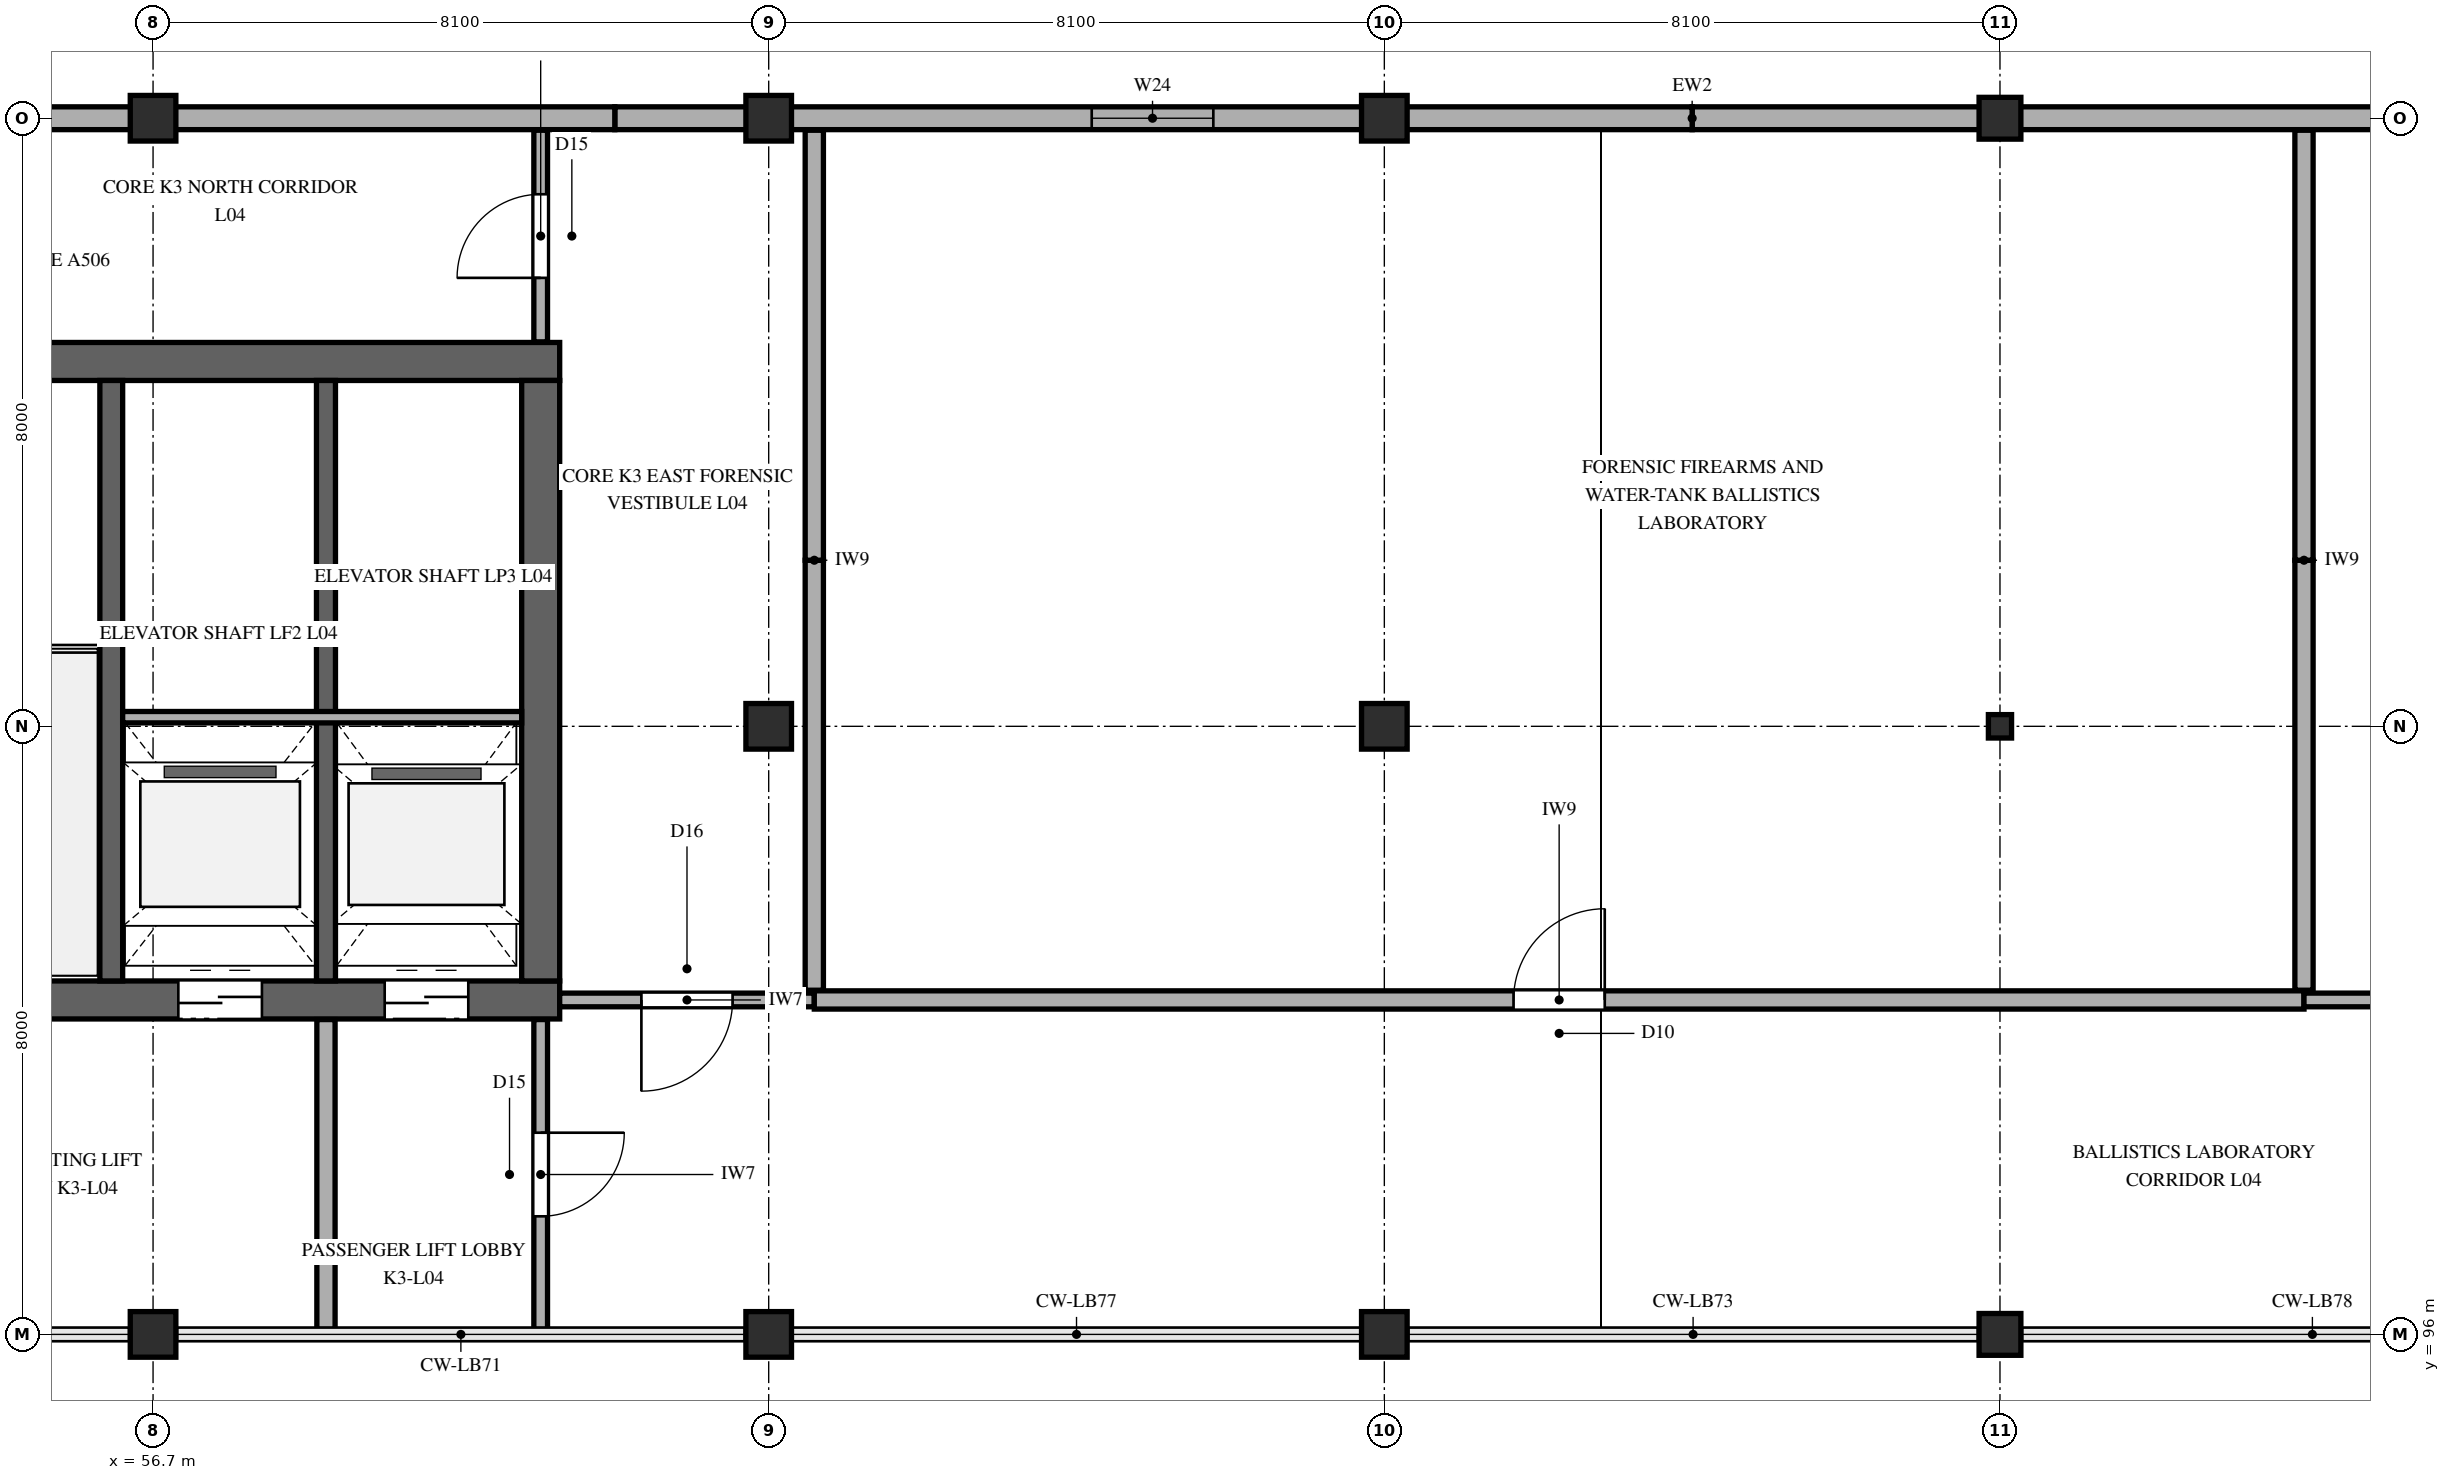
"""IFC4 building model, lengths in metres.
Left out: names, types, materials, properties, quantities, classifications, styles, units other than length and angle.
Written with IfcOpenShell. Run it as: python <this file> out.ifc"""

import sys

from ifc_helpers import new_model, si_unit, direction, frame, frame_2d, origin, origin_2d, place, context, subcontext, project, spatial, rectangle, i_section, extrude, element, fill, save


model = new_model("IFC4")
c1 = context("Model", 3, precision=1e-05, world=origin(), true_north=direction((0.0, 1.0)))
c2 = subcontext(c1, "Body", "Model", "MODEL_VIEW")
j1 = project(units=[si_unit("LENGTHUNIT", "METRE"), si_unit("PLANEANGLEUNIT", "RADIAN")], contexts=[c1])
p1 = place(None, origin())
s1 = spatial("IfcSite", under=j1, at=p1, CompositionType="ELEMENT")
p2 = place(p1, origin())
s2 = spatial("IfcBuilding", under=s1, at=p2, CompositionType="ELEMENT")
p3 = place(p2, frame((0.0, 0.0, 19.8)))
s3 = spatial("IfcBuildingStorey", under=s2, at=p3, CompositionType="ELEMENT", Elevation=19.8)
p4 = place(p3, frame((46.75, 100.4, 0.0), z_axis=(0.0, 0.0, 1.0), x_axis=(1.0, 0.0, 0.0)))
e1 = element("IfcWall", 1, at=p4, inside=s3, PredefinedType="SHEAR", context=c2, shape_type="SweptSolid", body=[
    extrude(rectangle(XDim=15.3, YDim=0.5, at=frame_2d((7.65, 0.0))), origin(), (0.0, 0.0, 1.0), 5.1),
])
p5 = place(p4, frame((1.0, 0.0, 0.0)))
e2 = element("IfcOpeningElement", 2, at=p5, cuts=e1, PredefinedType="OPENING", context=c2, shape_type="SweptSolid", body=[
    extrude(rectangle(XDim=1.15, YDim=2.25, at=frame_2d((0.575, 1.125))), frame((0.0, 0.26, 0.0), z_axis=(0.0, -1.0, 0.0), x_axis=(1.0, 0.0, 0.0)), (0.0, 0.0, 1.0), 0.52),
])
p6 = place(p4, frame((10.282, 0.0, 0.0)))
e3 = element("IfcOpeningElement", 3, at=p6, cuts=e1, PredefinedType="OPENING", context=c2, shape_type="SweptSolid", body=[
    extrude(rectangle(XDim=1.1, YDim=2.2, at=frame_2d((0.55, 1.1))), frame((0.0, 0.26, 0.0), z_axis=(0.0, -1.0, 0.0), x_axis=(1.0, 0.0, 0.0)), (0.0, 0.0, 1.0), 0.52),
])
p7 = place(p4, frame((12.998, 0.0, 0.0)))
e4 = element("IfcOpeningElement", 4, at=p7, cuts=e1, PredefinedType="OPENING", context=c2, shape_type="SweptSolid", body=[
    extrude(rectangle(XDim=1.1, YDim=2.2, at=frame_2d((0.55, 1.1))), frame((0.0, 0.26, 0.0), z_axis=(0.0, -1.0, 0.0), x_axis=(1.0, 0.0, 0.0)), (0.0, 0.0, 1.0), 0.52),
])
p8 = place(p3, frame((46.75, 108.8, 0.0), z_axis=(0.0, 0.0, 1.0), x_axis=(1.0, 0.0, 0.0)))
e5 = element("IfcWall", 5, at=p8, inside=s3, PredefinedType="SHEAR", context=c2, shape_type="SweptSolid", body=[
    extrude(rectangle(XDim=15.3, YDim=0.5, at=frame_2d((7.65, 0.0))), origin(), (0.0, 0.0, 1.0), 5.1),
])
p9 = place(p3, frame((61.8, 100.65, 0.0), z_axis=(0.0, 0.0, 1.0), x_axis=(0.0, 1.0, 0.0)))
e6 = element("IfcWall", 6, at=p9, inside=s3, PredefinedType="SHEAR", context=c2, shape_type="SweptSolid", body=[
    extrude(rectangle(XDim=7.9, YDim=0.5, at=frame_2d((3.95, 0.0))), origin(), (0.0, 0.0, 1.0), 5.1),
])
p10 = place(p3, frame((56.15, 100.65, 0.0), z_axis=(0.0, 0.0, 1.0), x_axis=(0.0, 1.0, 0.0)))
e7 = element("IfcWall", 7, at=p10, inside=s3, PredefinedType="SHEAR", context=c2, shape_type="SweptSolid", body=[
    extrude(rectangle(XDim=7.9, YDim=0.3, at=frame_2d((3.95, 0.0))), origin(), (0.0, 0.0, 1.0), 5.1),
])
p11 = place(p3, frame((58.975, 100.65, 0.0), z_axis=(0.0, 0.0, 1.0), x_axis=(0.0, 1.0, 0.0)))
e8 = element("IfcWall", 8, at=p11, inside=s3, PredefinedType="SHEAR", context=c2, shape_type="SweptSolid", body=[
    extrude(rectangle(XDim=7.9, YDim=0.25, at=frame_2d((3.95, 0.0))), origin(), (0.0, 0.0, 1.0), 5.1),
])
for number, where, z_axis, x_axis in (
    (9, (56.7, 96.0, 0.0), (0.0, 0.0, 1.0), (1.0, 0.0, 0.0)),
    (10, (56.7, 112.0, 0.0), (0.0, 0.0, 1.0), (1.0, 0.0, 0.0)),
    (11, (64.8, 96.0, 0.0), (0.0, 0.0, 1.0), (1.0, 0.0, 0.0)),
    (12, (64.8, 104.0, 0.0), (0.0, 0.0, 1.0), (1.0, 0.0, 0.0)),
    (13, (64.8, 112.0, 0.0), (0.0, 0.0, 1.0), (1.0, 0.0, 0.0)),
    (14, (72.9, 96.0, 0.0), (0.0, 0.0, 1.0), (1.0, 0.0, 0.0)),
    (15, (72.9, 104.0, 0.0), (0.0, 0.0, 1.0), (1.0, 0.0, 0.0)),
    (16, (72.9, 112.0, 0.0), (0.0, 0.0, 1.0), (1.0, 0.0, 0.0)),
):
    element("IfcColumn", number, at=place(p3, frame(where, z_axis=z_axis, x_axis=x_axis)), inside=s3, PredefinedType="COLUMN", context=c2, shape_type="SweptSolid", body=[
        extrude(rectangle(XDim=0.6, YDim=0.6, at=origin_2d()), origin(), (0.0, 0.0, 1.0), 5.1),
    ])
p12 = place(p3, frame((81.0, 96.0, 0.0), z_axis=(0.0, 0.0, 1.0), x_axis=(1.0, 0.0, 0.0)))
e17 = element("IfcColumn", 17, at=p12, inside=s3, PredefinedType="COLUMN", context=c2, shape_type="SweptSolid", body=[
    extrude(rectangle(XDim=0.55, YDim=0.55, at=origin_2d()), origin(), (0.0, 0.0, 1.0), 5.1),
])
p13 = place(p3, frame((81.0, 104.0, 0.0), z_axis=(0.0, 0.0, 1.0), x_axis=(1.0, 0.0, 0.0)))
e18 = element("IfcColumn", 18, at=p13, inside=s3, PredefinedType="COLUMN", context=c2, shape_type="SweptSolid", body=[
    extrude(i_section(OverallWidth=0.305, OverallDepth=0.308, WebThickness=0.01, FlangeThickness=0.015, FilletRadius=0.015, at=origin_2d()), origin(), (0.0, 0.0, 1.0), 5.1),
])
p14 = place(p3, frame((81.0, 112.0, 0.0), z_axis=(0.0, 0.0, 1.0), x_axis=(1.0, 0.0, 0.0)))
e19 = element("IfcColumn", 19, at=p14, inside=s3, PredefinedType="COLUMN", context=c2, shape_type="SweptSolid", body=[
    extrude(rectangle(XDim=0.55, YDim=0.55, at=origin_2d()), origin(), (0.0, 0.0, 1.0), 5.1),
])
p15 = place(p3, frame((91.125, 112.0, 0.0), z_axis=(0.0, 0.0, 1.0), x_axis=(-1.0, 0.0, 0.0)))
e20 = element("IfcWall", 20, at=p15, inside=s3, PredefinedType="SOLIDWALL", context=c2, shape_type="SweptSolid", body=[
    extrude(rectangle(XDim=14.175, YDim=0.3, at=frame_2d((7.087, 0.0))), origin(), (0.0, 0.0, 1.0), 4.202),
])
p16 = place(p3, frame((76.95, 112.0, 0.0), z_axis=(0.0, 0.0, 1.0), x_axis=(-1.0, 0.0, 0.0)))
e21 = element("IfcWall", 21, at=p16, inside=s3, PredefinedType="SOLIDWALL", context=c2, shape_type="SweptSolid", body=[
    extrude(rectangle(XDim=14.175, YDim=0.3, at=frame_2d((7.087, 0.0))), origin(), (0.0, 0.0, 1.0), 4.302),
])
p17 = place(p16, frame((6.3, 0.0, 0.95)))
e22 = element("IfcOpeningElement", 22, at=p17, cuts=e21, PredefinedType="OPENING", context=c2, shape_type="SweptSolid", body=[
    extrude(rectangle(XDim=1.6, YDim=1.4, at=frame_2d((0.8, 0.7))), frame((0.0, 0.16, 0.0), z_axis=(0.0, -1.0, 0.0), x_axis=(1.0, 0.0, 0.0)), (0.0, 0.0, 1.0), 0.32),
])
p18 = place(p3, frame((62.775, 112.0, 0.0), z_axis=(0.0, 0.0, 1.0), x_axis=(-1.0, 0.0, 0.0)))
e23 = element("IfcWall", 23, at=p18, inside=s3, PredefinedType="SOLIDWALL", context=c2, shape_type="SweptSolid", body=[
    extrude(rectangle(XDim=14.175, YDim=0.3, at=frame_2d((7.087, 0.0))), origin(), (0.0, 0.0, 1.0), 4.302),
])
p19 = place(p18, frame((9.0, 0.0, 0.95)))
e24 = element("IfcOpeningElement", 24, at=p19, cuts=e23, PredefinedType="OPENING", context=c2, shape_type="SweptSolid", body=[
    extrude(rectangle(XDim=0.9, YDim=1.8, at=frame_2d((0.45, 0.9))), frame((0.0, 0.16, 0.0), z_axis=(0.0, -1.0, 0.0), x_axis=(1.0, 0.0, 0.0)), (0.0, 0.0, 1.0), 0.32),
])
p20 = place(p3, frame((56.3, 104.12, 0.0), z_axis=(0.0, 0.0, 1.0), x_axis=(1.0, 0.0, 0.0)))
e25 = element("IfcWall", 25, at=p20, inside=s3, PredefinedType="PARTITIONING", context=c2, shape_type="SweptSolid", body=[
    extrude(rectangle(XDim=5.25, YDim=0.15, at=frame_2d((2.625, 0.0))), origin(), (0.0, 0.0, 1.0), 4.86),
])
p21 = place(p3, frame((62.05, 100.4, 0.0), z_axis=(0.0, 0.0, 1.0), x_axis=(1.0, 0.0, 0.0)))
e26 = element("IfcWall", 26, at=p21, inside=s3, PredefinedType="PARTITIONING", context=c2, shape_type="SweptSolid", body=[
    extrude(rectangle(XDim=3.35, YDim=0.18, at=frame_2d((1.675, 0.0))), origin(), (0.0, 0.0, 1.0), 4.86),
])
p22 = place(p21, frame((1.075, 0.0, 0.0)))
e27 = element("IfcOpeningElement", 27, at=p22, cuts=e26, PredefinedType="OPENING", context=c2, shape_type="SweptSolid", body=[
    extrude(rectangle(XDim=1.2, YDim=2.2, at=frame_2d((0.6, 1.1))), frame((0.0, 0.1, 0.0), z_axis=(0.0, -1.0, 0.0), x_axis=(1.0, 0.0, 0.0)), (0.0, 0.0, 1.0), 0.2),
])
p23 = place(p3, frame((65.4, 100.4, 0.0), z_axis=(0.0, 0.0, 1.0), x_axis=(1.0, 0.0, 0.0)))
e28 = element("IfcWall", 28, at=p23, inside=s3, PredefinedType="PARTITIONING", context=c2, shape_type="SweptSolid", body=[
    extrude(rectangle(XDim=19.6, YDim=0.24, at=frame_2d((9.8, 0.0))), origin(), (0.0, 0.0, 1.0), 4.86),
])
p24 = place(p23, frame((9.2, 0.0, 0.0)))
e29 = element("IfcOpeningElement", 29, at=p24, cuts=e28, PredefinedType="OPENING", context=c2, shape_type="SweptSolid", body=[
    extrude(rectangle(XDim=1.2, YDim=2.3, at=frame_2d((0.6, 1.15))), frame((0.0, 0.13, 0.0), z_axis=(0.0, -1.0, 0.0), x_axis=(1.0, 0.0, 0.0)), (0.0, 0.0, 1.0), 0.26),
])
p25 = place(p3, frame((85.0, 100.4, 0.0), z_axis=(0.0, 0.0, 1.0), x_axis=(1.0, 0.0, 0.0)))
e30 = element("IfcWall", 30, at=p25, inside=s3, PredefinedType="PARTITIONING", context=c2, shape_type="SweptSolid", body=[
    extrude(rectangle(XDim=20.132, YDim=0.18, at=frame_2d((10.066, 0.0))), origin(), (0.0, 0.0, 1.0), 4.86),
])
p26 = place(p25, frame((9.466, 0.0, 0.0)))
e31 = element("IfcOpeningElement", 31, at=p26, cuts=e30, PredefinedType="OPENING", context=c2, shape_type="SweptSolid", body=[
    extrude(rectangle(XDim=1.2, YDim=2.3, at=frame_2d((0.6, 1.15))), frame((0.0, 0.1, 0.0), z_axis=(0.0, -1.0, 0.0), x_axis=(1.0, 0.0, 0.0)), (0.0, 0.0, 1.0), 0.2),
])
p27 = place(p3, frame((58.975, 96.065, 0.0), z_axis=(0.0, 0.0, 1.0), x_axis=(0.0, 1.0, 0.0)))
e32 = element("IfcWall", 32, at=p27, inside=s3, PredefinedType="PARTITIONING", context=c2, shape_type="SweptSolid", body=[
    extrude(rectangle(XDim=4.077, YDim=0.24, at=frame_2d((2.039, 0.0))), origin(), (0.0, 0.0, 1.0), 4.86),
])
p28 = place(p3, frame((61.8, 96.065, 0.0), z_axis=(0.0, 0.0, 1.0), x_axis=(0.0, 1.0, 0.0)))
e33 = element("IfcWall", 33, at=p28, inside=s3, PredefinedType="PARTITIONING", context=c2, shape_type="SweptSolid", body=[
    extrude(rectangle(XDim=4.077, YDim=0.18, at=frame_2d((2.039, 0.0))), origin(), (0.0, 0.0, 1.0), 4.86),
])
p29 = place(p28, frame((1.489, 0.0, 0.0)))
e34 = element("IfcOpeningElement", 34, at=p29, cuts=e33, PredefinedType="OPENING", context=c2, shape_type="SweptSolid", body=[
    extrude(rectangle(XDim=1.1, YDim=2.2, at=frame_2d((0.55, 1.1))), frame((0.0, 0.1, 0.0), z_axis=(0.0, -1.0, 0.0), x_axis=(1.0, 0.0, 0.0)), (0.0, 0.0, 1.0), 0.2),
])
p30 = place(p3, frame((61.8, 109.058, 0.0), z_axis=(0.0, 0.0, 1.0), x_axis=(0.0, 1.0, 0.0)))
e35 = element("IfcWall", 35, at=p30, inside=s3, PredefinedType="PARTITIONING", context=c2, shape_type="SweptSolid", body=[
    extrude(rectangle(XDim=2.784, YDim=0.18, at=frame_2d((1.392, 0.0))), origin(), (0.0, 0.0, 1.0), 4.86),
])
p31 = place(p30, frame((0.842, 0.0, 0.0)))
e36 = element("IfcOpeningElement", 36, at=p31, cuts=e35, PredefinedType="OPENING", context=c2, shape_type="SweptSolid", body=[
    extrude(rectangle(XDim=1.1, YDim=2.2, at=frame_2d((0.55, 1.1))), frame((0.0, 0.1, 0.0), z_axis=(0.0, -1.0, 0.0), x_axis=(1.0, 0.0, 0.0)), (0.0, 0.0, 1.0), 0.2),
])
for number, where, z_axis, x_axis in (
    (37, (65.4, 100.528, 0.0), (0.0, 0.0, 1.0), (0.0, 1.0, 0.0)),
    (38, (65.4, 106.185, 0.0), (0.0, 0.0, 1.0), (0.0, 1.0, 0.0)),
):
    element("IfcWall", number, at=place(p3, frame(where, z_axis=z_axis, x_axis=x_axis)), inside=s3, PredefinedType="PARTITIONING", context=c2, shape_type="SweptSolid", body=[
        extrude(rectangle(XDim=5.657, YDim=0.24, at=frame_2d((2.829, 0.0))), origin(), (0.0, 0.0, 1.0), 4.86),
    ])
for number, where, z_axis, x_axis in (
    (39, (85.0, 100.528, 0.0), (0.0, 0.0, 1.0), (0.0, 1.0, 0.0)),
    (40, (85.0, 106.185, 0.0), (0.0, 0.0, 1.0), (0.0, 1.0, 0.0)),
):
    element("IfcWall", number, at=place(p3, frame(where, z_axis=z_axis, x_axis=x_axis)), inside=s3, PredefinedType="PARTITIONING", context=c2, shape_type="SweptSolid", body=[
        extrude(rectangle(XDim=5.657, YDim=0.24, at=frame_2d((2.829, 0.0))), origin(), (0.0, 0.0, 1.0), 4.498),
    ])
p32 = place(p17, origin())
e41 = element("IfcWindow", 41, at=p32, inside=s3, PartitioningType="SINGLE_PANEL", PredefinedType="WINDOW", context=c2, shape_type="SweptSolid", body=[
    extrude(rectangle(XDim=1.6, YDim=1.4, at=frame_2d((0.8, 0.7))), frame((0.0, 0.03, 0.0), z_axis=(0.0, -1.0, 0.0), x_axis=(1.0, 0.0, 0.0)), (0.0, 0.0, 1.0), 0.06),
])
fill(e22, e41)
p33 = place(p6, frame((1.1, 0.0, 0.0), z_axis=(0.0, 0.0, 1.0), x_axis=(-1.0, 0.0, 0.0)))
e42 = element("IfcDoor", 42, at=p33, inside=s3, OperationType="DOUBLE_DOOR_SLIDING", PredefinedType="DOOR", context=c2, shape_type="SweptSolid", body=[
    extrude(rectangle(XDim=1.1, YDim=2.2, at=frame_2d((0.55, 1.1))), frame((0.0, 0.025, 0.0), z_axis=(0.0, -1.0, 0.0), x_axis=(1.0, 0.0, 0.0)), (0.0, 0.0, 1.0), 0.05),
])
fill(e3, e42)
p34 = place(p7, frame((1.1, 0.0, 0.0), z_axis=(0.0, 0.0, 1.0), x_axis=(-1.0, 0.0, 0.0)))
e43 = element("IfcDoor", 43, at=p34, inside=s3, OperationType="DOUBLE_DOOR_SLIDING", PredefinedType="DOOR", context=c2, shape_type="SweptSolid", body=[
    extrude(rectangle(XDim=1.1, YDim=2.2, at=frame_2d((0.55, 1.1))), frame((0.0, 0.025, 0.0), z_axis=(0.0, -1.0, 0.0), x_axis=(1.0, 0.0, 0.0)), (0.0, 0.0, 1.0), 0.05),
])
fill(e4, e43)
p35 = place(p22, frame((1.2, 0.0, 0.0), z_axis=(0.0, 0.0, 1.0), x_axis=(-1.0, 0.0, 0.0)))
e44 = element("IfcDoor", 44, at=p35, inside=s3, OperationType="SINGLE_SWING_LEFT", PredefinedType="DOOR", context=c2, shape_type="SweptSolid", body=[
    extrude(rectangle(XDim=1.2, YDim=2.2, at=frame_2d((0.6, 1.1))), frame((0.0, 0.025, 0.0), z_axis=(0.0, -1.0, 0.0), x_axis=(1.0, 0.0, 0.0)), (0.0, 0.0, 1.0), 0.05),
])
fill(e27, e44)
p36 = place(p24, origin())
e45 = element("IfcDoor", 45, at=p36, inside=s3, OperationType="SINGLE_SWING_RIGHT", PredefinedType="DOOR", context=c2, shape_type="SweptSolid", body=[
    extrude(rectangle(XDim=1.2, YDim=2.3, at=frame_2d((0.6, 1.15))), frame((0.0, 0.025, 0.0), z_axis=(0.0, -1.0, 0.0), x_axis=(1.0, 0.0, 0.0)), (0.0, 0.0, 1.0), 0.05),
])
fill(e29, e45)
p37 = place(p29, frame((1.1, 0.0, 0.0), z_axis=(0.0, 0.0, 1.0), x_axis=(-1.0, 0.0, 0.0)))
e46 = element("IfcDoor", 46, at=p37, inside=s3, OperationType="SINGLE_SWING_RIGHT", PredefinedType="DOOR", context=c2, shape_type="SweptSolid", body=[
    extrude(rectangle(XDim=1.1, YDim=2.2, at=frame_2d((0.55, 1.1))), frame((0.0, 0.025, 0.0), z_axis=(0.0, -1.0, 0.0), x_axis=(1.0, 0.0, 0.0)), (0.0, 0.0, 1.0), 0.05),
])
fill(e34, e46)
p38 = place(p31, origin())
e47 = element("IfcDoor", 47, at=p38, inside=s3, OperationType="SINGLE_SWING_LEFT", PredefinedType="DOOR", context=c2, shape_type="SweptSolid", body=[
    extrude(rectangle(XDim=1.1, YDim=2.2, at=frame_2d((0.55, 1.1))), frame((0.0, 0.025, 0.0), z_axis=(0.0, -1.0, 0.0), x_axis=(1.0, 0.0, 0.0)), (0.0, 0.0, 1.0), 0.05),
])
fill(e36, e47)
save(model, sys.argv[1])
